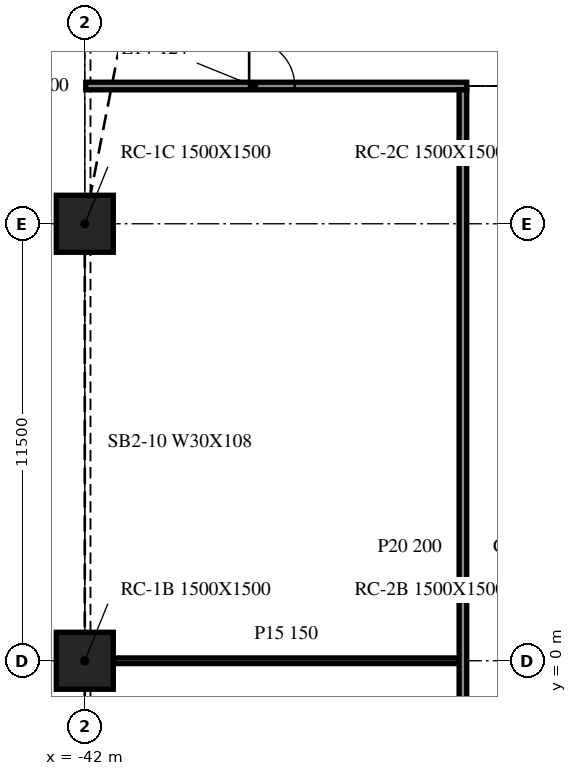
"""IFC4 building model, lengths in metres.
Left out: names, types, materials, properties, quantities, classifications, styles, units other than length and angle.
Written with IfcOpenShell. Run it as: python <this file> out.ifc"""

import sys

from ifc_helpers import new_model, si_unit, direction, frame, frame_2d, origin, origin_2d, place, context, subcontext, project, spatial, rectangle, extrude, element, fill, save


model = new_model("IFC4")
c1 = context("Model", 3, precision=1e-05, world=origin(), true_north=direction((0.0, 1.0)))
c2 = subcontext(c1, "Body", "Model", "MODEL_VIEW")
j1 = project(units=[si_unit("LENGTHUNIT", "METRE"), si_unit("PLANEANGLEUNIT", "RADIAN")], contexts=[c1])
p1 = place(None, origin())
s1 = spatial("IfcSite", under=j1, at=p1, CompositionType="ELEMENT")
p2 = place(p1, origin())
s2 = spatial("IfcBuilding", under=s1, at=p2, CompositionType="ELEMENT")
p3 = place(p2, frame((0.0, 0.0, 63.2)))
s3 = spatial("IfcBuildingStorey", under=s2, at=p3, CompositionType="ELEMENT", Elevation=63.2)
for number, where, z_axis, x_axis in (
    (1, (-42.0, 0.0, -0.34), (0.0, 0.0, 1.0), (1.0, 0.0, 0.0)),
    (2, (-42.0, 11.5, -0.34), (0.0, 0.0, 1.0), (1.0, 0.0, 0.0)),
):
    element("IfcColumn", number, at=place(p3, frame(where, z_axis=z_axis, x_axis=x_axis)), inside=s3, PredefinedType="COLUMN", context=c2, shape_type="SweptSolid", body=[
        extrude(rectangle(XDim=1.5, YDim=1.5, at=origin_2d()), origin(), (0.0, 0.0, 1.0), 4.3),
    ])
p4 = place(p3, frame((-41.25, 0.0, 0.0), z_axis=(0.0, 0.0, 1.0), x_axis=(1.0, 0.0, 0.0)))
e3 = element("IfcWall", 3, at=p4, inside=s3, PredefinedType="PARTITIONING", context=c2, shape_type="SweptSolid", body=[
    extrude(rectangle(XDim=9.1, YDim=0.15, at=frame_2d((4.55, 0.0))), origin(), (0.0, 0.0, 1.0), 3.96),
])
p5 = place(p3, frame((-41.975, 15.125, 0.0), z_axis=(0.0, 0.0, 1.0), x_axis=(1.0, 0.0, 0.0)))
e4 = element("IfcWall", 4, at=p5, inside=s3, PredefinedType="PARTITIONING", context=c2, shape_type="SweptSolid", body=[
    extrude(rectangle(XDim=10.025, YDim=0.2, at=frame_2d((5.013, 0.0))), origin(), (0.0, 0.0, 1.0), 3.96),
])
p6 = place(p5, frame((4.3, 0.0, 0.0)))
e5 = element("IfcOpeningElement", 5, at=p6, cuts=e4, PredefinedType="OPENING", context=c2, shape_type="SweptSolid", body=[
    extrude(rectangle(XDim=1.2, YDim=2.1, at=frame_2d((0.6, 1.05))), frame((0.0, 0.11, 0.0), z_axis=(0.0, -1.0, 0.0), x_axis=(1.0, 0.0, 0.0)), (0.0, 0.0, 1.0), 0.22),
])
p7 = place(p3, frame((-32.05, -9.025, 0.0), z_axis=(0.0, 0.0, 1.0), x_axis=(0.0, 1.0, 0.0)))
e6 = element("IfcWall", 6, at=p7, inside=s3, PredefinedType="PARTITIONING", context=c2, shape_type="SweptSolid", body=[
    extrude(rectangle(XDim=24.05, YDim=0.2, at=frame_2d((12.025, 0.0))), origin(), (0.0, 0.0, 1.0), 3.96),
])
p8 = place(p6, origin())
e7 = element("IfcDoor", 7, at=p8, inside=s3, OperationType="SINGLE_SWING_RIGHT", PredefinedType="DOOR", context=c2, shape_type="SweptSolid", body=[
    extrude(rectangle(XDim=1.2, YDim=2.1, at=frame_2d((0.6, 1.05))), frame((0.0, 0.025, 0.0), z_axis=(0.0, -1.0, 0.0), x_axis=(1.0, 0.0, 0.0)), (0.0, 0.0, 1.0), 0.05),
])
fill(e5, e7)
save(model, sys.argv[1])
